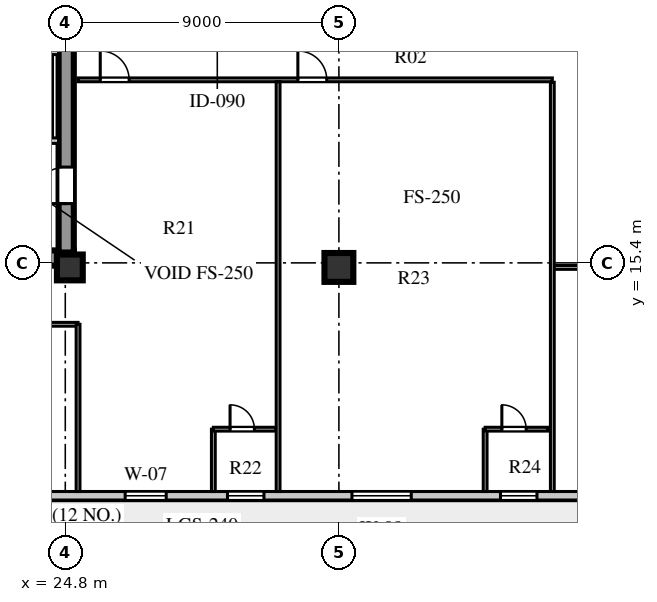
"""IFC4 building model, lengths in metres.
Left out: names, types, materials, properties, quantities, classifications, styles, units other than length and angle.
Written with IfcOpenShell. Run it as: python <this file> out.ifc"""

import sys

from ifc_helpers import new_model, si_unit, direction, frame, frame_2d, origin, origin_2d, place, context, subcontext, project, spatial, rectangle, extrude, element, fill, save


model = new_model("IFC4")
c1 = context("Model", 3, precision=1e-05, world=origin(), true_north=direction((0.0, 1.0)))
c2 = subcontext(c1, "Body", "Model", "MODEL_VIEW")
j1 = project(units=[si_unit("LENGTHUNIT", "METRE"), si_unit("PLANEANGLEUNIT", "RADIAN")], contexts=[c1])
p1 = place(None, origin())
s1 = spatial("IfcSite", under=j1, at=p1, CompositionType="ELEMENT")
p2 = place(p1, origin())
s2 = spatial("IfcBuilding", under=s1, at=p2, CompositionType="ELEMENT")
p3 = place(p2, frame((0.0, 0.0, 165.6)))
s3 = spatial("IfcBuildingStorey", under=s2, at=p3, CompositionType="ELEMENT", Elevation=165.6)
p4 = place(p3, frame((15.4, 15.56, 0.0), z_axis=(0.0, 0.0, 1.0), x_axis=(1.0, 0.0, 0.0)))
e1 = element("IfcWall", 1, at=p4, inside=s3, PredefinedType="SHEAR", context=c2, shape_type="SweptSolid", body=[
    extrude(rectangle(XDim=9.68, YDim=0.5, at=frame_2d((4.84, 0.0))), origin(), (0.0, 0.0, 1.0), 3.6),
])
p5 = place(p3, frame((24.83, 15.74, 0.0), z_axis=(0.0, 0.0, 1.0), x_axis=(0.0, 1.0, 0.0)))
e2 = element("IfcWall", 2, at=p5, inside=s3, PredefinedType="SHEAR", context=c2, shape_type="SweptSolid", body=[
    extrude(rectangle(XDim=25.76, YDim=0.5, at=frame_2d((12.88, 0.0))), origin(), (0.0, 0.0, 1.0), 3.6),
])
p6 = place(p5, frame((1.61, 0.0, 0.0)))
e3 = element("IfcOpeningElement", 3, at=p6, cuts=e2, PredefinedType="OPENING", context=c2, shape_type="SweptSolid", body=[
    extrude(rectangle(XDim=1.2, YDim=2.1, at=frame_2d((0.6, 1.05))), frame((0.0, 0.26, 0.0), z_axis=(0.0, -1.0, 0.0), x_axis=(1.0, 0.0, 0.0)), (0.0, 0.0, 1.0), 0.52),
])
p7 = place(p5, frame((6.78, 0.0, 0.0)))
e4 = element("IfcOpeningElement", 4, at=p7, cuts=e2, PredefinedType="OPENING", context=c2, shape_type="SweptSolid", body=[
    extrude(rectangle(XDim=0.85, YDim=2.06, at=frame_2d((0.425, 1.03))), frame((0.0, 0.26, 0.0), z_axis=(0.0, -1.0, 0.0), x_axis=(1.0, 0.0, 0.0)), (0.0, 0.0, 1.0), 0.52),
])
p8 = place(p5, frame((12.11, 0.0, 0.0)))
e5 = element("IfcOpeningElement", 5, at=p8, cuts=e2, PredefinedType="OPENING", context=c2, shape_type="SweptSolid", body=[
    extrude(rectangle(XDim=1.5, YDim=2.12, at=frame_2d((0.75, 1.06))), frame((0.0, 0.26, 0.0), z_axis=(0.0, -1.0, 0.0), x_axis=(1.0, 0.0, 0.0)), (0.0, 0.0, 1.0), 0.52),
])
p9 = place(p5, frame((20.11, 0.0, 0.0)))
e6 = element("IfcOpeningElement", 6, at=p9, cuts=e2, PredefinedType="OPENING", context=c2, shape_type="SweptSolid", body=[
    extrude(rectangle(XDim=1.2, YDim=2.12, at=frame_2d((0.6, 1.06))), frame((0.0, 0.26, 0.0), z_axis=(0.0, -1.0, 0.0), x_axis=(1.0, 0.0, 0.0)), (0.0, 0.0, 1.0), 0.52),
])
p10 = place(p5, frame((24.01, 0.0, 0.0)))
e7 = element("IfcOpeningElement", 7, at=p10, cuts=e2, PredefinedType="OPENING", context=c2, shape_type="SweptSolid", body=[
    extrude(rectangle(XDim=0.95, YDim=2.1, at=frame_2d((0.475, 1.05))), frame((0.0, 0.26, 0.0), z_axis=(0.0, -1.0, 0.0), x_axis=(1.0, 0.0, 0.0)), (0.0, 0.0, 1.0), 0.52),
])
p11 = place(p3, frame((24.95, 15.25, 0.0), z_axis=(0.0, 0.0, 1.0), x_axis=(1.0, 0.0, 0.0)))
e8 = element("IfcColumn", 8, at=p11, inside=s3, PredefinedType="COLUMN", context=c2, shape_type="SweptSolid", body=[
    extrude(rectangle(XDim=0.85, YDim=0.85, at=origin_2d()), origin(), (0.0, 0.0, 1.0), 3.6),
])
p12 = place(p3, frame((33.8, 15.25, 0.0), z_axis=(0.0, 0.0, 1.0), x_axis=(1.0, 0.0, 0.0)))
e9 = element("IfcColumn", 9, at=p12, inside=s3, PredefinedType="COLUMN", context=c2, shape_type="SweptSolid", body=[
    extrude(rectangle(XDim=0.95, YDim=0.95, at=origin_2d()), origin(), (0.0, 0.0, 1.0), 3.6),
])
p13 = place(p3, frame((13.05, 7.74, 0.0), z_axis=(0.0, 0.0, 1.0), x_axis=(1.0, 0.0, 0.0)))
e10 = element("IfcWall", 10, at=p13, inside=s3, PredefinedType="STANDARD", context=c2, shape_type="SweptSolid", body=[
    extrude(rectangle(XDim=32.5, YDim=0.28, at=frame_2d((16.25, 0.0))), origin(), (0.0, 0.0, 1.0), 3.6),
])
p14 = place(p13, frame((0.95, 0.0, 0.0)))
e11 = element("IfcOpeningElement", 11, at=p14, cuts=e10, PredefinedType="OPENING", context=c2, shape_type="SweptSolid", body=[
    extrude(rectangle(XDim=1.0, YDim=2.05, at=frame_2d((0.5, 1.025))), frame((0.0, 0.15, 0.0), z_axis=(0.0, -1.0, 0.0), x_axis=(1.0, 0.0, 0.0)), (0.0, 0.0, 1.0), 0.3),
])
p15 = place(p13, frame((5.98, 0.0, 0.8)))
e12 = element("IfcOpeningElement", 12, at=p15, cuts=e10, PredefinedType="OPENING", context=c2, shape_type="SweptSolid", body=[
    extrude(rectangle(XDim=2.1, YDim=1.95, at=frame_2d((1.05, 0.975))), frame((0.0, 0.15, 0.0), z_axis=(0.0, -1.0, 0.0), x_axis=(1.0, 0.0, 0.0)), (0.0, 0.0, 1.0), 0.3),
])
p16 = place(p13, frame((13.72, 0.0, 0.8)))
e13 = element("IfcOpeningElement", 13, at=p16, cuts=e10, PredefinedType="OPENING", context=c2, shape_type="SweptSolid", body=[
    extrude(rectangle(XDim=1.35, YDim=1.9, at=frame_2d((0.675, 0.95))), frame((0.0, 0.15, 0.0), z_axis=(0.0, -1.0, 0.0), x_axis=(1.0, 0.0, 0.0)), (0.0, 0.0, 1.0), 0.3),
])
p17 = place(p13, frame((17.085, 0.0, 0.8)))
e14 = element("IfcOpeningElement", 14, at=p17, cuts=e10, PredefinedType="OPENING", context=c2, shape_type="SweptSolid", body=[
    extrude(rectangle(XDim=1.2, YDim=1.75, at=frame_2d((0.6, 0.875))), frame((0.0, 0.15, 0.0), z_axis=(0.0, -1.0, 0.0), x_axis=(1.0, 0.0, 0.0)), (0.0, 0.0, 1.0), 0.3),
])
p18 = place(p13, frame((21.18, 0.0, 0.8)))
e15 = element("IfcOpeningElement", 15, at=p18, cuts=e10, PredefinedType="OPENING", context=c2, shape_type="SweptSolid", body=[
    extrude(rectangle(XDim=1.95, YDim=2.0, at=frame_2d((0.975, 1.0))), frame((0.0, 0.15, 0.0), z_axis=(0.0, -1.0, 0.0), x_axis=(1.0, 0.0, 0.0)), (0.0, 0.0, 1.0), 0.3),
])
p19 = place(p13, frame((26.065, 0.0, 0.8)))
e16 = element("IfcOpeningElement", 16, at=p19, cuts=e10, PredefinedType="OPENING", context=c2, shape_type="SweptSolid", body=[
    extrude(rectangle(XDim=1.2, YDim=1.75, at=frame_2d((0.6, 0.875))), frame((0.0, 0.15, 0.0), z_axis=(0.0, -1.0, 0.0), x_axis=(1.0, 0.0, 0.0)), (0.0, 0.0, 1.0), 0.3),
])
p20 = place(p13, frame((29.18, 0.0, 0.8)))
e17 = element("IfcOpeningElement", 17, at=p20, cuts=e10, PredefinedType="OPENING", context=c2, shape_type="SweptSolid", body=[
    extrude(rectangle(XDim=1.8, YDim=2.0, at=frame_2d((0.9, 1.0))), frame((0.0, 0.15, 0.0), z_axis=(0.0, -1.0, 0.0), x_axis=(1.0, 0.0, 0.0)), (0.0, 0.0, 1.0), 0.3),
])
p21 = place(p3, frame((19.64, 19.42, 0.0), z_axis=(0.0, 0.0, 1.0), x_axis=(1.0, 0.0, 0.0)))
e18 = element("IfcWall", 18, at=p21, inside=s3, PredefinedType="SOLIDWALL", context=c2, shape_type="SweptSolid", body=[
    extrude(rectangle(XDim=4.94, YDim=0.18, at=frame_2d((2.47, 0.0))), origin(), (0.0, 0.0, 1.0), 3.6),
])
p22 = place(p21, frame((0.72, 0.0, 0.0)))
e19 = element("IfcOpeningElement", 19, at=p22, cuts=e18, PredefinedType="OPENING", context=c2, shape_type="SweptSolid", body=[
    extrude(rectangle(XDim=1.1, YDim=2.1, at=frame_2d((0.55, 1.05))), frame((0.0, 0.1, 0.0), z_axis=(0.0, -1.0, 0.0), x_axis=(1.0, 0.0, 0.0)), (0.0, 0.0, 1.0), 0.2),
])
p23 = place(p21, frame((3.02, 0.0, 0.0)))
e20 = element("IfcOpeningElement", 20, at=p23, cuts=e18, PredefinedType="OPENING", context=c2, shape_type="SweptSolid", body=[
    extrude(rectangle(XDim=1.1, YDim=2.1, at=frame_2d((0.55, 1.05))), frame((0.0, 0.1, 0.0), z_axis=(0.0, -1.0, 0.0), x_axis=(1.0, 0.0, 0.0)), (0.0, 0.0, 1.0), 0.2),
])
p24 = place(p3, frame((19.64, 22.34, 0.0), z_axis=(0.0, 0.0, 1.0), x_axis=(1.0, 0.0, 0.0)))
e21 = element("IfcWall", 21, at=p24, inside=s3, PredefinedType="SOLIDWALL", context=c2, shape_type="SweptSolid", body=[
    extrude(rectangle(XDim=4.94, YDim=0.18, at=frame_2d((2.47, 0.0))), origin(), (0.0, 0.0, 1.0), 3.6),
])
p25 = place(p3, frame((25.22, 21.42, 0.0), z_axis=(0.0, 0.0, 1.0), x_axis=(1.0, 0.0, 0.0)))
e22 = element("IfcWall", 22, at=p25, inside=s3, PredefinedType="PLUMBINGWALL", context=c2, shape_type="SweptSolid", body=[
    extrude(rectangle(XDim=15.6, YDim=0.125, at=frame_2d((7.8, 0.0))), origin(), (0.0, 0.0, 1.0), 3.25),
])
p26 = place(p25, frame((0.73, 0.0, 0.0)))
e23 = element("IfcOpeningElement", 23, at=p26, cuts=e22, PredefinedType="OPENING", context=c2, shape_type="SweptSolid", body=[
    extrude(rectangle(XDim=0.95, YDim=2.1, at=frame_2d((0.475, 1.05))), frame((0.0, 0.073, 0.0), z_axis=(0.0, -1.0, 0.0), x_axis=(1.0, 0.0, 0.0)), (0.0, 0.0, 1.0), 0.145),
])
p27 = place(p25, frame((7.23, 0.0, 0.0)))
e24 = element("IfcOpeningElement", 24, at=p27, cuts=e22, PredefinedType="OPENING", context=c2, shape_type="SweptSolid", body=[
    extrude(rectangle(XDim=0.95, YDim=2.1, at=frame_2d((0.475, 1.05))), frame((0.0, 0.073, 0.0), z_axis=(0.0, -1.0, 0.0), x_axis=(1.0, 0.0, 0.0)), (0.0, 0.0, 1.0), 0.145),
])
p28 = place(p3, frame((40.82, 15.25, 0.0), z_axis=(0.0, 0.0, 1.0), x_axis=(1.0, 0.0, 0.0)))
e25 = element("IfcWall", 25, at=p28, inside=s3, PredefinedType="PLUMBINGWALL", context=c2, shape_type="SweptSolid", body=[
    extrude(rectangle(XDim=9.7, YDim=0.125, at=frame_2d((4.85, 0.0))), origin(), (0.0, 0.0, 1.0), 2.95),
])
p29 = place(p3, frame((13.39, 13.38, 0.0), z_axis=(0.0, 0.0, 1.0), x_axis=(1.0, 0.0, 0.0)))
e26 = element("IfcWall", 26, at=p29, inside=s3, PredefinedType="PLUMBINGWALL", context=c2, shape_type="SweptSolid", body=[
    extrude(rectangle(XDim=11.83, YDim=0.125, at=frame_2d((5.915, 0.0))), origin(), (0.0, 0.0, 1.0), 3.6),
])
p30 = place(p29, frame((4.76, 0.0, 0.0)))
e27 = element("IfcOpeningElement", 27, at=p30, cuts=e26, PredefinedType="OPENING", context=c2, shape_type="SweptSolid", body=[
    extrude(rectangle(XDim=1.0, YDim=2.08, at=frame_2d((0.5, 1.04))), frame((0.0, 0.073, 0.0), z_axis=(0.0, -1.0, 0.0), x_axis=(1.0, 0.0, 0.0)), (0.0, 0.0, 1.0), 0.145),
])
p31 = place(p3, frame((25.22, 7.88, 0.0), z_axis=(0.0, 0.0, 1.0), x_axis=(0.0, 1.0, 0.0)))
e28 = element("IfcWall", 28, at=p31, inside=s3, PredefinedType="PLUMBINGWALL", context=c2, shape_type="SweptSolid", body=[
    extrude(rectangle(XDim=5.5, YDim=0.125, at=frame_2d((2.75, 0.0))), origin(), (0.0, 0.0, 1.0), 3.15),
])
p32 = place(p3, frame((40.82, 7.88, 0.0), z_axis=(0.0, 0.0, 1.0), x_axis=(0.0, 1.0, 0.0)))
e29 = element("IfcWall", 29, at=p32, inside=s3, PredefinedType="PLUMBINGWALL", context=c2, shape_type="SweptSolid", body=[
    extrude(rectangle(XDim=13.46, YDim=0.125, at=frame_2d((6.73, 0.0))), origin(), (0.0, 0.0, 1.0), 3.6),
])
p33 = place(p3, frame((29.67, 7.88, 0.0), z_axis=(0.0, 0.0, 1.0), x_axis=(0.0, 1.0, 0.0)))
e30 = element("IfcWall", 30, at=p33, inside=s3, PredefinedType="PLUMBINGWALL", context=c2, shape_type="SweptSolid", body=[
    extrude(rectangle(XDim=2.05, YDim=0.125, at=frame_2d((1.025, 0.0))), origin(), (0.0, 0.0, 1.0), 3.6),
])
p34 = place(p3, frame((29.67, 9.93, 0.0), z_axis=(0.0, 0.0, 1.0), x_axis=(1.0, 0.0, 0.0)))
e31 = element("IfcWall", 31, at=p34, inside=s3, PredefinedType="PLUMBINGWALL", context=c2, shape_type="SweptSolid", body=[
    extrude(rectangle(XDim=2.05, YDim=0.125, at=frame_2d((1.025, 0.0))), origin(), (0.0, 0.0, 1.0), 3.6),
])
p35 = place(p34, frame((0.55, 0.0, 0.0)))
e32 = element("IfcOpeningElement", 32, at=p35, cuts=e31, PredefinedType="OPENING", context=c2, shape_type="SweptSolid", body=[
    extrude(rectangle(XDim=0.8, YDim=2.05, at=frame_2d((0.4, 1.025))), frame((0.0, 0.073, 0.0), z_axis=(0.0, -1.0, 0.0), x_axis=(1.0, 0.0, 0.0)), (0.0, 0.0, 1.0), 0.145),
])
p36 = place(p3, frame((31.8, 7.88, 0.0), z_axis=(0.0, 0.0, 1.0), x_axis=(0.0, 1.0, 0.0)))
e33 = element("IfcWall", 33, at=p36, inside=s3, PredefinedType="PLUMBINGWALL", context=c2, shape_type="SweptSolid", body=[
    extrude(rectangle(XDim=13.48, YDim=0.125, at=frame_2d((6.74, 0.0))), origin(), (0.0, 0.0, 1.0), 3.6),
])
p37 = place(p3, frame((38.61, 7.88, 0.0), z_axis=(0.0, 0.0, 1.0), x_axis=(0.0, 1.0, 0.0)))
e34 = element("IfcWall", 34, at=p37, inside=s3, PredefinedType="PLUMBINGWALL", context=c2, shape_type="SweptSolid", body=[
    extrude(rectangle(XDim=2.05, YDim=0.125, at=frame_2d((1.025, 0.0))), origin(), (0.0, 0.0, 1.0), 3.6),
])
p38 = place(p3, frame((38.61, 9.93, 0.0), z_axis=(0.0, 0.0, 1.0), x_axis=(1.0, 0.0, 0.0)))
e35 = element("IfcWall", 35, at=p38, inside=s3, PredefinedType="PLUMBINGWALL", context=c2, shape_type="SweptSolid", body=[
    extrude(rectangle(XDim=2.05, YDim=0.125, at=frame_2d((1.025, 0.0))), origin(), (0.0, 0.0, 1.0), 3.6),
])
p39 = place(p38, frame((0.55, 0.0, 0.0)))
e36 = element("IfcOpeningElement", 36, at=p39, cuts=e35, PredefinedType="OPENING", context=c2, shape_type="SweptSolid", body=[
    extrude(rectangle(XDim=0.8, YDim=2.05, at=frame_2d((0.4, 1.025))), frame((0.0, 0.073, 0.0), z_axis=(0.0, -1.0, 0.0), x_axis=(1.0, 0.0, 0.0)), (0.0, 0.0, 1.0), 0.145),
])
p40 = place(p16, origin())
e37 = element("IfcWindow", 37, at=p40, inside=s3, PartitioningType="SINGLE_PANEL", PredefinedType="WINDOW", context=c2, shape_type="SweptSolid", body=[
    extrude(rectangle(XDim=1.35, YDim=1.9, at=frame_2d((0.675, 0.95))), frame((0.0, 0.03, 0.0), z_axis=(0.0, -1.0, 0.0), x_axis=(1.0, 0.0, 0.0)), (0.0, 0.0, 1.0), 0.06),
])
fill(e13, e37)
p41 = place(p17, origin())
e38 = element("IfcWindow", 38, at=p41, inside=s3, PartitioningType="SINGLE_PANEL", PredefinedType="WINDOW", context=c2, shape_type="SweptSolid", body=[
    extrude(rectangle(XDim=1.2, YDim=1.75, at=frame_2d((0.6, 0.875))), frame((0.0, 0.03, 0.0), z_axis=(0.0, -1.0, 0.0), x_axis=(1.0, 0.0, 0.0)), (0.0, 0.0, 1.0), 0.06),
])
fill(e14, e38)
p42 = place(p18, origin())
e39 = element("IfcWindow", 39, at=p42, inside=s3, PartitioningType="SINGLE_PANEL", PredefinedType="WINDOW", context=c2, shape_type="SweptSolid", body=[
    extrude(rectangle(XDim=1.95, YDim=2.0, at=frame_2d((0.975, 1.0))), frame((0.0, 0.03, 0.0), z_axis=(0.0, -1.0, 0.0), x_axis=(1.0, 0.0, 0.0)), (0.0, 0.0, 1.0), 0.06),
])
fill(e15, e39)
p43 = place(p19, origin())
e40 = element("IfcWindow", 40, at=p43, inside=s3, PartitioningType="SINGLE_PANEL", PredefinedType="WINDOW", context=c2, shape_type="SweptSolid", body=[
    extrude(rectangle(XDim=1.2, YDim=1.75, at=frame_2d((0.6, 0.875))), frame((0.0, 0.03, 0.0), z_axis=(0.0, -1.0, 0.0), x_axis=(1.0, 0.0, 0.0)), (0.0, 0.0, 1.0), 0.06),
])
fill(e16, e40)
p44 = place(p6, frame((1.2, 0.0, 0.0), z_axis=(0.0, 0.0, 1.0), x_axis=(-1.0, 0.0, 0.0)))
e41 = element("IfcDoor", 41, at=p44, inside=s3, OperationType="SINGLE_SWING_RIGHT", PredefinedType="DOOR", context=c2, shape_type="SweptSolid", body=[
    extrude(rectangle(XDim=1.2, YDim=2.1, at=frame_2d((0.6, 1.05))), frame((0.0, 0.025, 0.0), z_axis=(0.0, -1.0, 0.0), x_axis=(1.0, 0.0, 0.0)), (0.0, 0.0, 1.0), 0.05),
])
fill(e3, e41)
p45 = place(p26, frame((0.95, 0.0, 0.0), z_axis=(0.0, 0.0, 1.0), x_axis=(-1.0, 0.0, 0.0)))
e42 = element("IfcDoor", 42, at=p45, inside=s3, OperationType="SINGLE_SWING_RIGHT", PredefinedType="DOOR", context=c2, shape_type="SweptSolid", body=[
    extrude(rectangle(XDim=0.95, YDim=2.1, at=frame_2d((0.475, 1.05))), frame((0.0, 0.025, 0.0), z_axis=(0.0, -1.0, 0.0), x_axis=(1.0, 0.0, 0.0)), (0.0, 0.0, 1.0), 0.05),
])
fill(e23, e42)
p46 = place(p35, origin())
e43 = element("IfcDoor", 43, at=p46, inside=s3, OperationType="SINGLE_SWING_LEFT", PredefinedType="DOOR", context=c2, shape_type="SweptSolid", body=[
    extrude(rectangle(XDim=0.8, YDim=2.05, at=frame_2d((0.4, 1.025))), frame((0.0, 0.025, 0.0), z_axis=(0.0, -1.0, 0.0), x_axis=(1.0, 0.0, 0.0)), (0.0, 0.0, 1.0), 0.05),
])
fill(e32, e43)
p47 = place(p27, frame((0.95, 0.0, 0.0), z_axis=(0.0, 0.0, 1.0), x_axis=(-1.0, 0.0, 0.0)))
e44 = element("IfcDoor", 44, at=p47, inside=s3, OperationType="SINGLE_SWING_RIGHT", PredefinedType="DOOR", context=c2, shape_type="SweptSolid", body=[
    extrude(rectangle(XDim=0.95, YDim=2.1, at=frame_2d((0.475, 1.05))), frame((0.0, 0.025, 0.0), z_axis=(0.0, -1.0, 0.0), x_axis=(1.0, 0.0, 0.0)), (0.0, 0.0, 1.0), 0.05),
])
fill(e24, e44)
p48 = place(p39, origin())
e45 = element("IfcDoor", 45, at=p48, inside=s3, OperationType="SINGLE_SWING_LEFT", PredefinedType="DOOR", context=c2, shape_type="SweptSolid", body=[
    extrude(rectangle(XDim=0.8, YDim=2.05, at=frame_2d((0.4, 1.025))), frame((0.0, 0.025, 0.0), z_axis=(0.0, -1.0, 0.0), x_axis=(1.0, 0.0, 0.0)), (0.0, 0.0, 1.0), 0.05),
])
fill(e36, e45)
save(model, sys.argv[1])
